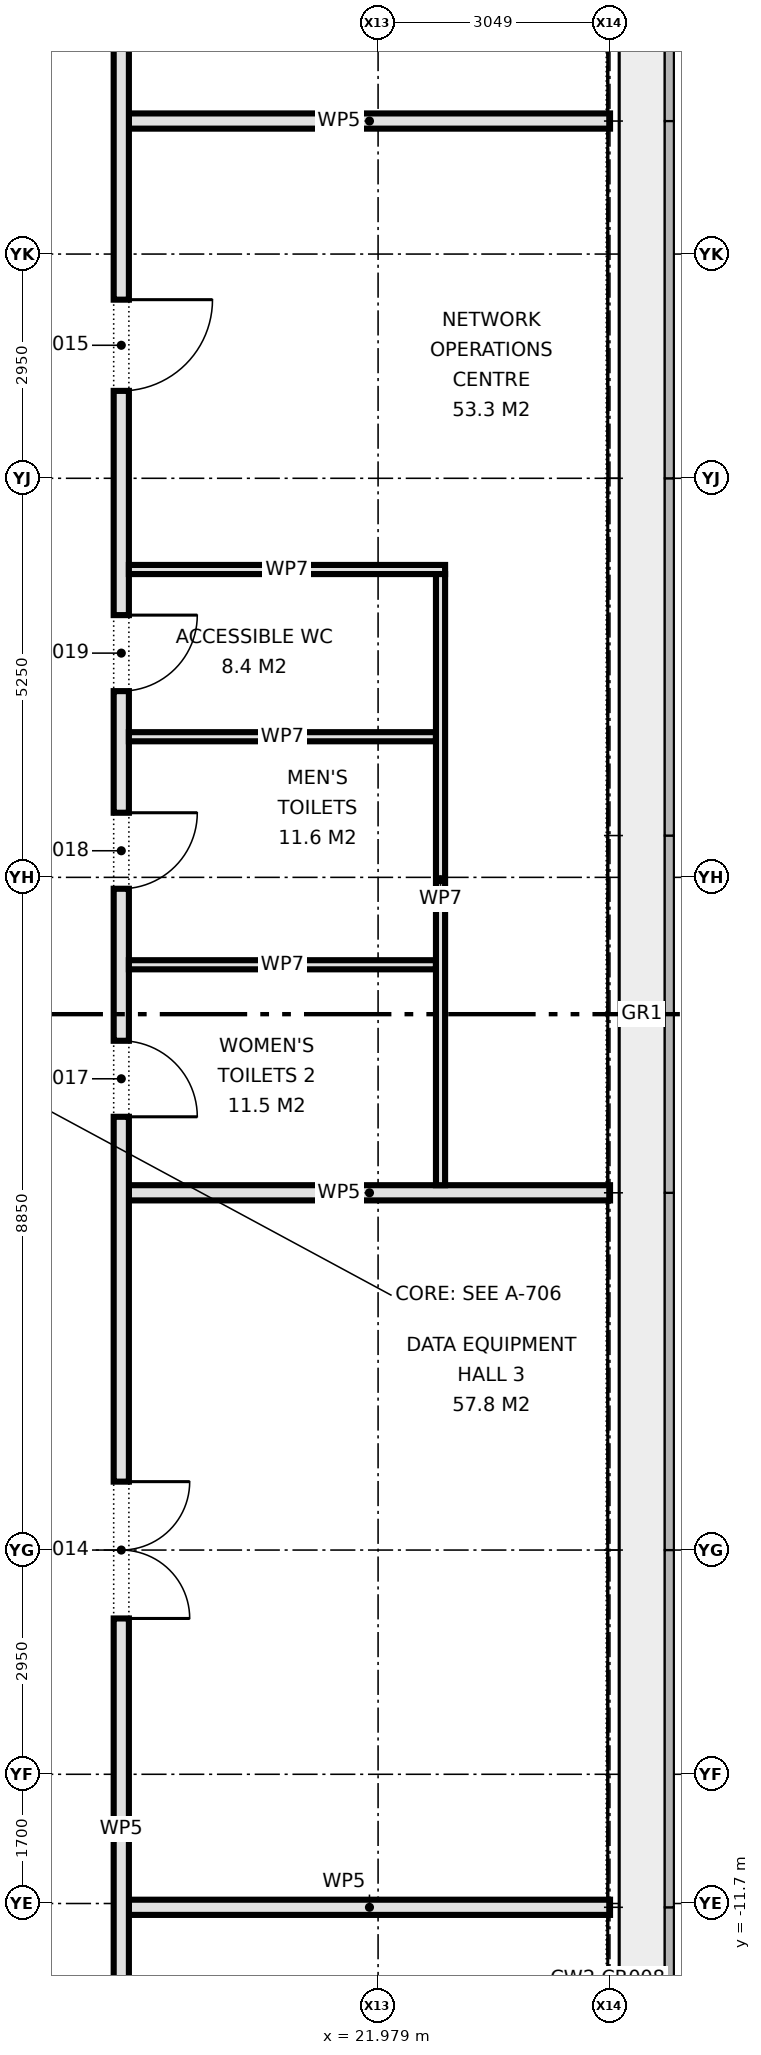
"""IFC4 building model, lengths in metres.
Left out: names, types, materials, properties, quantities, classifications, styles, units other than length and angle.
Written with IfcOpenShell. Run it as: python <this file> out.ifc"""

import sys

from ifc_helpers import new_model, si_unit, direction, frame, frame_2d, origin, place, context, subcontext, project, spatial, rectangle, extrude, element, fill, save


model = new_model("IFC4")
c1 = context("Model", 3, precision=1e-05, world=origin(), true_north=direction((0.0, 1.0)))
c2 = subcontext(c1, "Body", "Model", "MODEL_VIEW")
j1 = project(units=[si_unit("LENGTHUNIT", "METRE"), si_unit("PLANEANGLEUNIT", "RADIAN")], contexts=[c1])
p1 = place(None, origin())
s1 = spatial("IfcSite", under=j1, at=p1, CompositionType="ELEMENT")
p2 = place(p1, origin())
s2 = spatial("IfcBuilding", under=s1, at=p2, CompositionType="ELEMENT")
p3 = place(p2, frame((0.0, 0.0, 40.1)))
s3 = spatial("IfcBuildingStorey", under=s2, at=p3, CompositionType="ELEMENT", Elevation=40.1)
for number, where, z_axis, x_axis in (
    (1, (18.7, -11.75, 0.0), (0.0, 0.0, 1.0), (1.0, 0.0, 0.0)),
    (2, (18.7, -2.35, 0.0), (0.0, 0.0, 1.0), (1.0, 0.0, 0.0)),
    (3, (18.7, 11.75, 0.0), (0.0, 0.0, 1.0), (1.0, 0.0, 0.0)),
):
    element("IfcWall", number, at=place(p3, frame(where, z_axis=z_axis, x_axis=x_axis)), inside=s3, PredefinedType="PARTITIONING", context=c2, shape_type="SweptSolid", body=[
        extrude(rectangle(XDim=6.33, YDim=0.2, at=frame_2d((3.165, 0.0))), origin(), (0.0, 0.0, 1.0), 4.575),
    ])
p4 = place(p3, frame((18.6, -13.5, 0.0), z_axis=(0.0, 0.0, 1.0), x_axis=(0.0, 1.0, 0.0)))
e4 = element("IfcWall", 4, at=p4, inside=s3, PredefinedType="PARTITIONING", context=c2, shape_type="SweptSolid", body=[
    extrude(rectangle(XDim=27.0, YDim=0.2, at=frame_2d((13.5, 0.0))), origin(), (0.0, 0.0, 1.0), 4.575),
])
p5 = place(p4, frame((5.55, 0.0, 0.0)))
e5 = element("IfcOpeningElement", 5, at=p5, cuts=e4, PredefinedType="OPENING", context=c2, shape_type="SweptSolid", body=[
    extrude(rectangle(XDim=1.8, YDim=2.1, at=frame_2d((0.9, 1.05))), frame((0.0, 0.11, 0.0), z_axis=(0.0, -1.0, 0.0), x_axis=(1.0, 0.0, 0.0)), (0.0, 0.0, 1.0), 0.22),
])
p6 = place(p4, frame((21.7, 0.0, 0.0)))
e6 = element("IfcOpeningElement", 6, at=p6, cuts=e4, PredefinedType="OPENING", context=c2, shape_type="SweptSolid", body=[
    extrude(rectangle(XDim=1.2, YDim=2.1, at=frame_2d((0.6, 1.05))), frame((0.0, 0.11, 0.0), z_axis=(0.0, -1.0, 0.0), x_axis=(1.0, 0.0, 0.0)), (0.0, 0.0, 1.0), 0.22),
])
p7 = place(p4, frame((12.15, 0.0, 0.0)))
e7 = element("IfcOpeningElement", 7, at=p7, cuts=e4, PredefinedType="OPENING", context=c2, shape_type="SweptSolid", body=[
    extrude(rectangle(XDim=1.0, YDim=2.1, at=frame_2d((0.5, 1.05))), frame((0.0, 0.11, 0.0), z_axis=(0.0, -1.0, 0.0), x_axis=(1.0, 0.0, 0.0)), (0.0, 0.0, 1.0), 0.22),
])
p8 = place(p4, frame((15.15, 0.0, 0.0)))
e8 = element("IfcOpeningElement", 8, at=p8, cuts=e4, PredefinedType="OPENING", context=c2, shape_type="SweptSolid", body=[
    extrude(rectangle(XDim=1.0, YDim=2.1, at=frame_2d((0.5, 1.05))), frame((0.0, 0.11, 0.0), z_axis=(0.0, -1.0, 0.0), x_axis=(1.0, 0.0, 0.0)), (0.0, 0.0, 1.0), 0.22),
])
p9 = place(p4, frame((17.75, 0.0, 0.0)))
e9 = element("IfcOpeningElement", 9, at=p9, cuts=e4, PredefinedType="OPENING", context=c2, shape_type="SweptSolid", body=[
    extrude(rectangle(XDim=1.0, YDim=2.1, at=frame_2d((0.5, 1.05))), frame((0.0, 0.11, 0.0), z_axis=(0.0, -1.0, 0.0), x_axis=(1.0, 0.0, 0.0)), (0.0, 0.0, 1.0), 0.22),
])
for number, where, z_axis, x_axis in (
    (10, (18.7, 0.65, 0.0), (0.0, 0.0, 1.0), (1.0, 0.0, 0.0)),
    (11, (18.7, 3.65, 0.0), (0.0, 0.0, 1.0), (1.0, 0.0, 0.0)),
):
    element("IfcWall", number, at=place(p3, frame(where, z_axis=z_axis, x_axis=x_axis)), inside=s3, PredefinedType="PARTITIONING", context=c2, shape_type="SweptSolid", body=[
        extrude(rectangle(XDim=4.04, YDim=0.12, at=frame_2d((2.02, 0.0))), origin(), (0.0, 0.0, 1.0), 4.575),
    ])
p10 = place(p3, frame((18.7, 5.85, 0.0), z_axis=(0.0, 0.0, 1.0), x_axis=(1.0, 0.0, 0.0)))
e12 = element("IfcWall", 12, at=p10, inside=s3, PredefinedType="PARTITIONING", context=c2, shape_type="SweptSolid", body=[
    extrude(rectangle(XDim=4.16, YDim=0.12, at=frame_2d((2.08, 0.0))), origin(), (0.0, 0.0, 1.0), 4.575),
])
p11 = place(p3, frame((22.8, -2.25, 0.0), z_axis=(0.0, 0.0, 1.0), x_axis=(0.0, 1.0, 0.0)))
e13 = element("IfcWall", 13, at=p11, inside=s3, PredefinedType="PARTITIONING", context=c2, shape_type="SweptSolid", body=[
    extrude(rectangle(XDim=8.04, YDim=0.12, at=frame_2d((4.02, 0.0))), origin(), (0.0, 0.0, 1.0), 4.575),
])
p12 = place(p5, frame((1.8, 0.0, 0.0), z_axis=(0.0, 0.0, 1.0), x_axis=(-1.0, 0.0, 0.0)))
e14 = element("IfcDoor", 14, at=p12, inside=s3, OperationType="DOUBLE_DOOR_SINGLE_SWING", PredefinedType="DOOR", context=c2, shape_type="SweptSolid", body=[
    extrude(rectangle(XDim=1.8, YDim=2.1, at=frame_2d((0.9, 1.05))), frame((0.0, 0.025, 0.0), z_axis=(0.0, -1.0, 0.0), x_axis=(1.0, 0.0, 0.0)), (0.0, 0.0, 1.0), 0.05),
])
fill(e5, e14)
p13 = place(p6, frame((1.2, 0.0, 0.0), z_axis=(0.0, 0.0, 1.0), x_axis=(-1.0, 0.0, 0.0)))
e15 = element("IfcDoor", 15, at=p13, inside=s3, OperationType="SINGLE_SWING_LEFT", PredefinedType="DOOR", context=c2, shape_type="SweptSolid", body=[
    extrude(rectangle(XDim=1.2, YDim=2.1, at=frame_2d((0.6, 1.05))), frame((0.0, 0.025, 0.0), z_axis=(0.0, -1.0, 0.0), x_axis=(1.0, 0.0, 0.0)), (0.0, 0.0, 1.0), 0.05),
])
fill(e6, e15)
p14 = place(p7, frame((1.0, 0.0, 0.0), z_axis=(0.0, 0.0, 1.0), x_axis=(-1.0, 0.0, 0.0)))
e16 = element("IfcDoor", 16, at=p14, inside=s3, OperationType="SINGLE_SWING_RIGHT", PredefinedType="DOOR", context=c2, shape_type="SweptSolid", body=[
    extrude(rectangle(XDim=1.0, YDim=2.1, at=frame_2d((0.5, 1.05))), frame((0.0, 0.025, 0.0), z_axis=(0.0, -1.0, 0.0), x_axis=(1.0, 0.0, 0.0)), (0.0, 0.0, 1.0), 0.05),
])
fill(e7, e16)
p15 = place(p8, frame((1.0, 0.0, 0.0), z_axis=(0.0, 0.0, 1.0), x_axis=(-1.0, 0.0, 0.0)))
e17 = element("IfcDoor", 17, at=p15, inside=s3, OperationType="SINGLE_SWING_LEFT", PredefinedType="DOOR", context=c2, shape_type="SweptSolid", body=[
    extrude(rectangle(XDim=1.0, YDim=2.1, at=frame_2d((0.5, 1.05))), frame((0.0, 0.025, 0.0), z_axis=(0.0, -1.0, 0.0), x_axis=(1.0, 0.0, 0.0)), (0.0, 0.0, 1.0), 0.05),
])
fill(e8, e17)
p16 = place(p9, frame((1.0, 0.0, 0.0), z_axis=(0.0, 0.0, 1.0), x_axis=(-1.0, 0.0, 0.0)))
e18 = element("IfcDoor", 18, at=p16, inside=s3, OperationType="SINGLE_SWING_LEFT", PredefinedType="DOOR", context=c2, shape_type="SweptSolid", body=[
    extrude(rectangle(XDim=1.0, YDim=2.1, at=frame_2d((0.5, 1.05))), frame((0.0, 0.025, 0.0), z_axis=(0.0, -1.0, 0.0), x_axis=(1.0, 0.0, 0.0)), (0.0, 0.0, 1.0), 0.05),
])
fill(e9, e18)
save(model, sys.argv[1])
